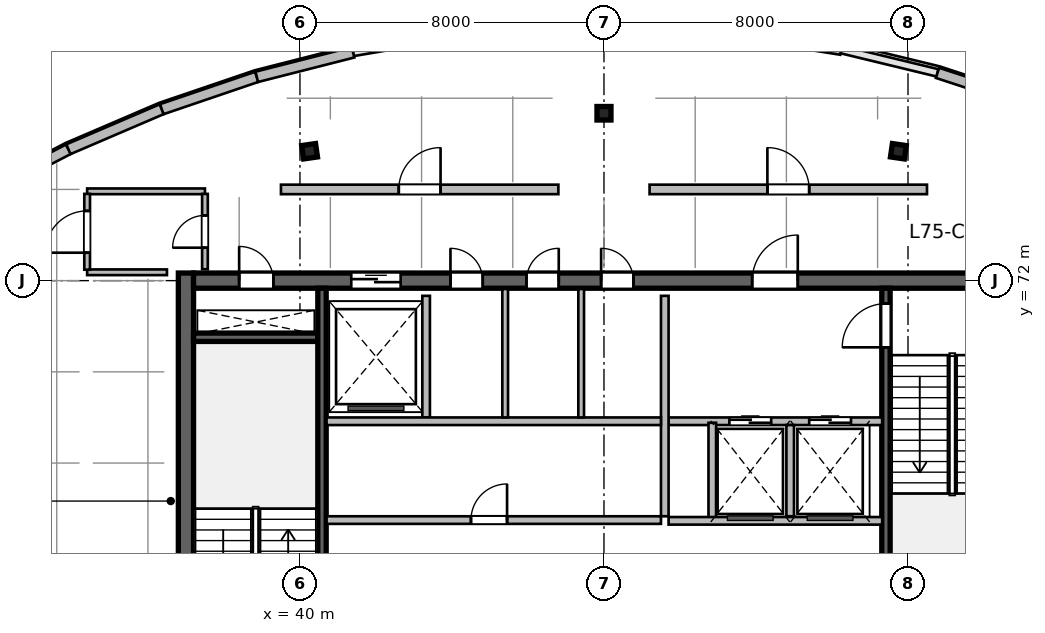
"""IFC4 building model, lengths in metres.
Left out: names, types, materials, properties, quantities, classifications, styles, units other than length and angle.
Written with IfcOpenShell. Run it as: python <this file> out.ifc"""

import sys

from ifc_helpers import new_model, si_unit, direction, frame, frame_2d, origin, origin_2d, place, context, subcontext, project, spatial, rectangle, i_section, extrude, source, transform, mapped, element, fill, save


model = new_model("IFC4")
c1 = context("Model", 3, precision=1e-05, world=origin(), true_north=direction((0.0, 1.0)))
c2 = subcontext(c1, "Body", "Model", "MODEL_VIEW")
j1 = project(units=[si_unit("LENGTHUNIT", "METRE"), si_unit("PLANEANGLEUNIT", "RADIAN")], contexts=[c1])
p1 = place(None, origin())
s1 = spatial("IfcSite", under=j1, at=p1, CompositionType="ELEMENT")
p2 = place(p1, origin())
s2 = spatial("IfcBuilding", under=s1, at=p2, CompositionType="ELEMENT")
p3 = place(p2, frame((0.0, 0.0, 307.8)))
s3 = spatial("IfcBuildingStorey", under=s2, at=p3, CompositionType="ELEMENT", Elevation=307.8)
m1 = source(origin(), c2, "Body", "SweptSolid", [
    extrude(rectangle(XDim=12.0, YDim=0.4, at=frame_2d((6.0, 0.0))), origin(), (0.0, 0.0, 1.0), 4.8),
])
p4 = place(p3, frame((37.0, 60.2, 0.0), z_axis=(0.0, 0.0, 1.0), x_axis=(0.0, 1.0, 0.0)))
e1 = element("IfcWall", 1, at=p4, inside=s3, PredefinedType="SHEAR", context=c2, shape_type="MappedRepresentation", body=[
    mapped(m1, transform((0.0, 0.0, 0.0), scale=1.0)),
])
m2 = source(origin(), c2, "Body", "SweptSolid", [
    extrude(rectangle(XDim=21.6, YDim=0.4, at=frame_2d((10.8, 0.0))), origin(), (0.0, 0.0, 1.0), 4.8),
])
p5 = place(p3, frame((37.2, 72.0, 0.0), z_axis=(0.0, 0.0, 1.0), x_axis=(1.0, 0.0, 0.0)))
e2 = element("IfcWall", 2, at=p5, inside=s3, PredefinedType="SHEAR", context=c2, shape_type="MappedRepresentation", body=[
    mapped(m2, transform((0.0, 0.0, 0.0), scale=1.0)),
])
p6 = place(p5, frame((1.2, 0.0, 0.0)))
e3 = element("IfcOpeningElement", 3, at=p6, cuts=e2, PredefinedType="OPENING", context=c2, shape_type="SweptSolid", body=[
    extrude(rectangle(XDim=0.9, YDim=2.1, at=frame_2d((0.45, 1.05))), frame((0.0, 0.21, 0.0), z_axis=(0.0, -1.0, 0.0), x_axis=(1.0, 0.0, 0.0)), (0.0, 0.0, 1.0), 0.42),
])
p7 = place(p5, frame((14.7, 0.0, 0.0)))
e4 = element("IfcOpeningElement", 4, at=p7, cuts=e2, PredefinedType="OPENING", context=c2, shape_type="SweptSolid", body=[
    extrude(rectangle(XDim=1.2, YDim=2.15, at=frame_2d((0.6, 1.075))), frame((0.0, 0.21, 0.0), z_axis=(0.0, -1.0, 0.0), x_axis=(1.0, 0.0, 0.0)), (0.0, 0.0, 1.0), 0.42),
])
p8 = place(p5, frame((4.15, 0.0, 0.0)))
e5 = element("IfcOpeningElement", 5, at=p8, cuts=e2, PredefinedType="OPENING", context=c2, shape_type="SweptSolid", body=[
    extrude(rectangle(XDim=1.3, YDim=2.15, at=frame_2d((0.65, 1.075))), frame((0.0, 0.21, 0.0), z_axis=(0.0, -1.0, 0.0), x_axis=(1.0, 0.0, 0.0)), (0.0, 0.0, 1.0), 0.42),
])
p9 = place(p5, frame((6.76, 0.0, 0.0)))
e6 = element("IfcOpeningElement", 6, at=p9, cuts=e2, PredefinedType="OPENING", context=c2, shape_type="SweptSolid", body=[
    extrude(rectangle(XDim=0.85, YDim=2.1, at=frame_2d((0.425, 1.05))), frame((0.0, 0.21, 0.0), z_axis=(0.0, -1.0, 0.0), x_axis=(1.0, 0.0, 0.0)), (0.0, 0.0, 1.0), 0.42),
])
p10 = place(p5, frame((8.76, 0.0, 0.0)))
e7 = element("IfcOpeningElement", 7, at=p10, cuts=e2, PredefinedType="OPENING", context=c2, shape_type="SweptSolid", body=[
    extrude(rectangle(XDim=0.85, YDim=2.1, at=frame_2d((0.425, 1.05))), frame((0.0, 0.21, 0.0), z_axis=(0.0, -1.0, 0.0), x_axis=(1.0, 0.0, 0.0)), (0.0, 0.0, 1.0), 0.42),
])
p11 = place(p5, frame((10.725, 0.0, 0.0)))
e8 = element("IfcOpeningElement", 8, at=p11, cuts=e2, PredefinedType="OPENING", context=c2, shape_type="SweptSolid", body=[
    extrude(rectangle(XDim=0.85, YDim=2.1, at=frame_2d((0.425, 1.05))), frame((0.0, 0.21, 0.0), z_axis=(0.0, -1.0, 0.0), x_axis=(1.0, 0.0, 0.0)), (0.0, 0.0, 1.0), 0.42),
])
m3 = source(origin(), c2, "Body", "SweptSolid", [
    extrude(rectangle(XDim=3.27, YDim=0.22, at=frame_2d((1.635, 0.0))), origin(), (0.0, 0.0, 1.0), 4.8),
])
p12 = place(p3, frame((37.2, 70.51, 0.0), z_axis=(0.0, 0.0, 1.0), x_axis=(1.0, 0.0, 0.0)))
e9 = element("IfcWall", 9, at=p12, inside=s3, PredefinedType="SHEAR", context=c2, shape_type="MappedRepresentation", body=[
    mapped(m3, transform((0.0, 0.0, 0.0), scale=1.0)),
])
m4 = source(origin(), c2, "Body", "SweptSolid", [
    extrude(rectangle(XDim=11.2, YDim=0.22, at=frame_2d((5.6, 0.0))), origin(), (0.0, 0.0, 1.0), 4.8),
])
p13 = place(p3, frame((40.58, 60.6, 0.0), z_axis=(0.0, 0.0, 1.0), x_axis=(0.0, 1.0, 0.0)))
e10 = element("IfcWall", 10, at=p13, inside=s3, PredefinedType="SHEAR", context=c2, shape_type="MappedRepresentation", body=[
    mapped(m4, transform((0.0, 0.0, 0.0), scale=1.0)),
])
p14 = place(p3, frame((55.42, 60.6, 0.0), z_axis=(0.0, 0.0, 1.0), x_axis=(0.0, 1.0, 0.0)))
e11 = element("IfcWall", 11, at=p14, inside=s3, PredefinedType="SHEAR", context=c2, shape_type="MappedRepresentation", body=[
    mapped(m4, transform((0.0, 0.0, 0.0), scale=1.0)),
])
p15 = place(p14, frame((9.645, 0.0, 0.0)))
e12 = element("IfcOpeningElement", 12, at=p15, cuts=e11, PredefinedType="OPENING", context=c2, shape_type="SweptSolid", body=[
    extrude(rectangle(XDim=1.15, YDim=2.15, at=frame_2d((0.575, 1.075))), frame((0.0, 0.12, 0.0), z_axis=(0.0, -1.0, 0.0), x_axis=(1.0, 0.0, 0.0)), (0.0, 0.0, 1.0), 0.24),
])
m5 = source(origin(), c2, "Body", "SweptSolid", [
    extrude(i_section(OverallWidth=0.369, OverallDepth=0.356, WebThickness=0.011, FlangeThickness=0.018, at=origin_2d()), origin(), (0.0, 0.0, 1.0), 4.8),
])
for number, where, z_axis, x_axis in (
    (13, (40.253, 75.404, 0.0), (0.0, 0.0, 1.0), (-0.143, 0.99, 0.0)),
    (14, (48.0, 76.404, 0.0), (0.0, 0.0, 1.0), (0.0, 1.0, 0.0)),
    (15, (55.747, 75.404, 0.0), (0.0, 0.0, 1.0), (0.143, 0.99, 0.0)),
):
    element("IfcColumn", number, at=place(p3, frame(where, z_axis=z_axis, x_axis=x_axis)), inside=s3, PredefinedType="COLUMN", context=c2, shape_type="MappedRepresentation", body=[
        mapped(m5, transform((0.0, 0.0, 0.0), scale=1.0)),
    ])
m6 = source(origin(), c2, "Body", "SweptSolid", [
    extrude(rectangle(XDim=2.711, YDim=0.28, at=frame_2d((1.356, 0.0))), origin(), (0.0, 0.0, 1.0), 4.5),
])
p16 = place(p3, frame((31.502, 74.205, 0.0), z_axis=(0.0, 0.0, 1.0), x_axis=(0.886828760751, 0.462098202881, 0.0)))
e16 = element("IfcWall", 16, at=p16, inside=s3, PredefinedType="SOLIDWALL", context=c2, shape_type="MappedRepresentation", body=[
    mapped(m6, transform((0.0, 0.0, 0.0), scale=1.0)),
])
m7 = source(origin(), c2, "Body", "SweptSolid", [
    extrude(rectangle(XDim=2.673, YDim=0.28, at=frame_2d((1.337, 0.0))), origin(), (0.0, 0.0, 1.0), 4.5),
])
p17 = place(p3, frame((33.907, 75.458, 0.0), z_axis=(0.0, 0.0, 1.0), x_axis=(0.919036345912, 0.394172798266, 0.0)))
e17 = element("IfcWall", 17, at=p17, inside=s3, PredefinedType="SOLIDWALL", context=c2, shape_type="MappedRepresentation", body=[
    mapped(m7, transform((0.0, 0.0, 0.0), scale=1.0)),
])
m8 = source(origin(), c2, "Body", "SweptSolid", [
    extrude(rectangle(XDim=2.64, YDim=0.28, at=frame_2d((1.32, 0.0))), origin(), (0.0, 0.0, 1.0), 4.5),
])
p18 = place(p3, frame((36.364, 76.511, 0.0), z_axis=(0.0, 0.0, 1.0), x_axis=(0.946685911962, 0.322158011064, 0.0)))
e18 = element("IfcWall", 18, at=p18, inside=s3, PredefinedType="SOLIDWALL", context=c2, shape_type="MappedRepresentation", body=[
    mapped(m8, transform((0.0, 0.0, 0.0), scale=1.0)),
])
m9 = source(origin(), c2, "Body", "SweptSolid", [
    extrude(rectangle(XDim=2.614, YDim=0.28, at=frame_2d((1.307, 0.0))), origin(), (0.0, 0.0, 1.0), 4.5),
])
p19 = place(p3, frame((38.863, 77.362, 0.0), z_axis=(0.0, 0.0, 1.0), x_axis=(0.969106509315, 0.246642602978, 0.0)))
e19 = element("IfcWall", 19, at=p19, inside=s3, PredefinedType="SOLIDWALL", context=c2, shape_type="MappedRepresentation", body=[
    mapped(m9, transform((0.0, 0.0, 0.0), scale=1.0)),
])
m10 = source(origin(), c2, "Body", "SweptSolid", [
    extrude(rectangle(XDim=2.593, YDim=0.28, at=frame_2d((1.296, 0.0))), origin(), (0.0, 0.0, 1.0), 4.5),
])
p20 = place(p3, frame((51.679, 78.488, 0.0), z_axis=(0.0, 0.0, 1.0), x_axis=(0.987661204406, -0.156605700126, 0.0)))
e20 = element("IfcWall", 20, at=p20, inside=s3, PredefinedType="SOLIDWALL", context=c2, shape_type="MappedRepresentation", body=[
    mapped(m10, transform((0.0, 0.0, 0.0), scale=1.0)),
])
m11 = source(origin(), c2, "Body", "SweptSolid", [
    extrude(rectangle(XDim=2.636, YDim=0.28, at=frame_2d((1.318, 0.0))), origin(), (0.0, 0.0, 1.0), 4.5),
])
p21 = place(p3, frame((56.777, 77.467, 0.0), z_axis=(0.0, 0.0, 1.0), x_axis=(0.950200321617, -0.311639774097, 0.0)))
e21 = element("IfcWall", 21, at=p21, inside=s3, PredefinedType="SOLIDWALL", context=c2, shape_type="MappedRepresentation", body=[
    mapped(m11, transform((0.0, 0.0, 0.0), scale=1.0)),
])
m12 = source(origin(), c2, "Body", "SweptSolid", [
    extrude(rectangle(XDim=5.62, YDim=0.2, at=frame_2d((2.81, 0.0))), origin(), (0.0, 0.0, 1.0), 4.5),
])
p22 = place(p3, frame((49.7, 68.3, 0.0), z_axis=(0.0, 0.0, 1.0), x_axis=(1.0, 0.0, 0.0)))
e22 = element("IfcWall", 22, at=p22, inside=s3, PredefinedType="SOLIDWALL", context=c2, shape_type="MappedRepresentation", body=[
    mapped(m12, transform((0.0, 0.0, 0.0), scale=1.0)),
])
p23 = place(p22, frame((1.6, 0.0, 0.0)))
e23 = element("IfcOpeningElement", 23, at=p23, cuts=e22, PredefinedType="OPENING", context=c2, shape_type="SweptSolid", body=[
    extrude(rectangle(XDim=1.1, YDim=2.15, at=frame_2d((0.55, 1.075))), frame((0.0, 0.11, 0.0), z_axis=(0.0, -1.0, 0.0), x_axis=(1.0, 0.0, 0.0)), (0.0, 0.0, 1.0), 0.22),
])
p24 = place(p22, frame((3.7, 0.0, 0.0)))
e24 = element("IfcOpeningElement", 24, at=p24, cuts=e22, PredefinedType="OPENING", context=c2, shape_type="SweptSolid", body=[
    extrude(rectangle(XDim=1.1, YDim=2.15, at=frame_2d((0.55, 1.075))), frame((0.0, 0.11, 0.0), z_axis=(0.0, -1.0, 0.0), x_axis=(1.0, 0.0, 0.0)), (0.0, 0.0, 1.0), 0.22),
])
m13 = source(origin(), c2, "Body", "SweptSolid", [
    extrude(rectangle(XDim=5.8, YDim=0.2, at=frame_2d((2.9, 0.0))), origin(), (0.0, 0.0, 1.0), 4.5),
])
p25 = place(p3, frame((49.6, 65.8, 0.0), z_axis=(0.0, 0.0, 1.0), x_axis=(0.0, 1.0, 0.0)))
e25 = element("IfcWall", 25, at=p25, inside=s3, PredefinedType="SOLIDWALL", context=c2, shape_type="MappedRepresentation", body=[
    mapped(m13, transform((0.0, 0.0, 0.0), scale=1.0)),
])
m14 = source(origin(), c2, "Body", "SweptSolid", [
    extrude(rectangle(XDim=2.58, YDim=0.2, at=frame_2d((1.29, 0.0))), origin(), (0.0, 0.0, 1.0), 4.5),
])
p26 = place(p3, frame((50.85, 65.68, 0.0), z_axis=(0.0, 0.0, 1.0), x_axis=(0.0, 1.0, 0.0)))
e26 = element("IfcWall", 26, at=p26, inside=s3, PredefinedType="SOLIDWALL", context=c2, shape_type="MappedRepresentation", body=[
    mapped(m14, transform((0.0, 0.0, 0.0), scale=1.0)),
])
m15 = source(origin(), c2, "Body", "SweptSolid", [
    extrude(rectangle(XDim=2.4, YDim=0.2, at=frame_2d((1.2, 0.0))), origin(), (0.0, 0.0, 1.0), 4.5),
])
p27 = place(p3, frame((52.9, 65.8, 0.0), z_axis=(0.0, 0.0, 1.0), x_axis=(0.0, 1.0, 0.0)))
e27 = element("IfcWall", 27, at=p27, inside=s3, PredefinedType="SOLIDWALL", context=c2, shape_type="MappedRepresentation", body=[
    mapped(m15, transform((0.0, 0.0, 0.0), scale=1.0)),
])
p28 = place(p3, frame((49.7, 65.68, 0.0), z_axis=(0.0, 0.0, 1.0), x_axis=(1.0, 0.0, 0.0)))
e28 = element("IfcWall", 28, at=p28, inside=s3, PredefinedType="SOLIDWALL", context=c2, shape_type="MappedRepresentation", body=[
    mapped(m12, transform((0.0, 0.0, 0.0), scale=1.0)),
])
m16 = source(origin(), c2, "Body", "SweptSolid", [
    extrude(rectangle(XDim=3.2, YDim=0.2, at=frame_2d((1.6, 0.0))), origin(), (0.0, 0.0, 1.0), 4.5),
])
p29 = place(p3, frame((43.32, 68.4, 0.0), z_axis=(0.0, 0.0, 1.0), x_axis=(0.0, 1.0, 0.0)))
e29 = element("IfcWall", 29, at=p29, inside=s3, PredefinedType="SOLIDWALL", context=c2, shape_type="MappedRepresentation", body=[
    mapped(m16, transform((0.0, 0.0, 0.0), scale=1.0)),
])
m17 = source(origin(), c2, "Body", "SweptSolid", [
    extrude(rectangle(XDim=8.8, YDim=0.2, at=frame_2d((4.4, 0.0))), origin(), (0.0, 0.0, 1.0), 4.5),
])
p30 = place(p3, frame((40.7, 68.3, 0.0), z_axis=(0.0, 0.0, 1.0), x_axis=(1.0, 0.0, 0.0)))
e30 = element("IfcWall", 30, at=p30, inside=s3, PredefinedType="SOLIDWALL", context=c2, shape_type="MappedRepresentation", body=[
    mapped(m17, transform((0.0, 0.0, 0.0), scale=1.0)),
])
m18 = source(origin(), c2, "Body", "SweptSolid", [
    extrude(rectangle(XDim=3.38, YDim=0.15, at=frame_2d((1.69, 0.0))), origin(), (0.0, 0.0, 1.0), 4.5),
])
for number, where, z_axis, x_axis in (
    (31, (45.4, 68.4, 0.0), (0.0, 0.0, 1.0), (0.0, 1.0, 0.0)),
    (32, (47.4, 68.4, 0.0), (0.0, 0.0, 1.0), (0.0, 1.0, 0.0)),
):
    element("IfcWall", number, at=place(p3, frame(where, z_axis=z_axis, x_axis=x_axis)), inside=s3, PredefinedType="PARTITIONING", context=c2, shape_type="MappedRepresentation", body=[
        mapped(m18, transform((0.0, 0.0, 0.0), scale=1.0)),
    ])
p31 = place(p3, frame((40.7, 65.7, 0.0), z_axis=(0.0, 0.0, 1.0), x_axis=(1.0, 0.0, 0.0)))
e33 = element("IfcWall", 33, at=p31, inside=s3, PredefinedType="SOLIDWALL", context=c2, shape_type="MappedRepresentation", body=[
    mapped(m17, transform((0.0, 0.0, 0.0), scale=1.0)),
])
p32 = place(p31, frame((3.8, 0.0, 0.0)))
e34 = element("IfcOpeningElement", 34, at=p32, cuts=e33, PredefinedType="OPENING", context=c2, shape_type="SweptSolid", body=[
    extrude(rectangle(XDim=0.95, YDim=2.15, at=frame_2d((0.475, 1.075))), frame((0.0, 0.11, 0.0), z_axis=(0.0, -1.0, 0.0), x_axis=(1.0, 0.0, 0.0)), (0.0, 0.0, 1.0), 0.22),
])
m19 = source(origin(), c2, "Body", "SweptSolid", [
    extrude(rectangle(XDim=2.1, YDim=0.15, at=frame_2d((1.05, 0.0))), origin(), (0.0, 0.0, 1.0), 4.5),
])
p33 = place(p3, frame((34.4, 72.22, 0.0), z_axis=(0.0, 0.0, 1.0), x_axis=(1.0, 0.0, 0.0)))
e35 = element("IfcWall", 35, at=p33, inside=s3, PredefinedType="PARTITIONING", context=c2, shape_type="MappedRepresentation", body=[
    mapped(m19, transform((0.0, 0.0, 0.0), scale=1.0)),
])
m20 = source(origin(), c2, "Body", "SweptSolid", [
    extrude(rectangle(XDim=3.1, YDim=0.15, at=frame_2d((1.55, 0.0))), origin(), (0.0, 0.0, 1.0), 3.931),
])
p34 = place(p3, frame((34.4, 74.35, 0.0), z_axis=(0.0, 0.0, 1.0), x_axis=(1.0, 0.0, 0.0)))
e36 = element("IfcWall", 36, at=p34, inside=s3, PredefinedType="PARTITIONING", context=c2, shape_type="MappedRepresentation", body=[
    mapped(m20, transform((0.0, 0.0, 0.0), scale=1.0)),
])
m21 = source(origin(), c2, "Body", "SweptSolid", [
    extrude(rectangle(XDim=1.995, YDim=0.15, at=frame_2d((0.998, 0.0))), origin(), (0.0, 0.0, 1.0), 4.5),
])
p35 = place(p3, frame((34.4, 72.288, 0.0), z_axis=(0.0, 0.0, 1.0), x_axis=(0.0, 1.0, 0.0)))
e37 = element("IfcWall", 37, at=p35, inside=s3, PredefinedType="PARTITIONING", context=c2, shape_type="MappedRepresentation", body=[
    mapped(m21, transform((0.0, 0.0, 0.0), scale=1.0)),
])
p36 = place(p35, frame((0.448, 0.0, 0.0)))
e38 = element("IfcOpeningElement", 38, at=p36, cuts=e37, PredefinedType="OPENING", context=c2, shape_type="SweptSolid", body=[
    extrude(rectangle(XDim=1.1, YDim=2.15, at=frame_2d((0.55, 1.075))), frame((0.0, 0.085, 0.0), z_axis=(0.0, -1.0, 0.0), x_axis=(1.0, 0.0, 0.0)), (0.0, 0.0, 1.0), 0.17),
])
m22 = source(origin(), c2, "Body", "SweptSolid", [
    extrude(rectangle(XDim=1.982, YDim=0.15, at=frame_2d((0.991, 0.0))), origin(), (0.0, 0.0, 1.0), 4.5),
])
p37 = place(p3, frame((37.5, 72.3, 0.0), z_axis=(0.0, 0.0, 1.0), x_axis=(0.0, 1.0, 0.0)))
e39 = element("IfcWall", 39, at=p37, inside=s3, PredefinedType="PARTITIONING", context=c2, shape_type="MappedRepresentation", body=[
    mapped(m22, transform((0.0, 0.0, 0.0), scale=1.0)),
])
p38 = place(p37, frame((0.566, 0.0, 0.0)))
e40 = element("IfcOpeningElement", 40, at=p38, cuts=e39, PredefinedType="OPENING", context=c2, shape_type="SweptSolid", body=[
    extrude(rectangle(XDim=0.85, YDim=2.1, at=frame_2d((0.425, 1.05))), frame((0.0, 0.085, 0.0), z_axis=(0.0, -1.0, 0.0), x_axis=(1.0, 0.0, 0.0)), (0.0, 0.0, 1.0), 0.17),
])
m23 = source(origin(), c2, "Body", "SweptSolid", [
    extrude(rectangle(XDim=7.3, YDim=0.25, at=frame_2d((3.65, 0.0))), origin(), (0.0, 0.0, 1.0), 4.5),
])
p39 = place(p3, frame((39.5, 74.4, 0.0), z_axis=(0.0, 0.0, 1.0), x_axis=(1.0, 0.0, 0.0)))
e41 = element("IfcWall", 41, at=p39, inside=s3, PredefinedType="PARTITIONING", context=c2, shape_type="MappedRepresentation", body=[
    mapped(m23, transform((0.0, 0.0, 0.0), scale=1.0)),
])
p40 = place(p39, frame((3.1, 0.0, 0.0)))
e42 = element("IfcOpeningElement", 42, at=p40, cuts=e41, PredefinedType="OPENING", context=c2, shape_type="SweptSolid", body=[
    extrude(rectangle(XDim=1.1, YDim=2.15, at=frame_2d((0.55, 1.075))), frame((0.0, 0.135, 0.0), z_axis=(0.0, -1.0, 0.0), x_axis=(1.0, 0.0, 0.0)), (0.0, 0.0, 1.0), 0.27),
])
p41 = place(p3, frame((49.2, 74.4, 0.0), z_axis=(0.0, 0.0, 1.0), x_axis=(1.0, 0.0, 0.0)))
e43 = element("IfcWall", 43, at=p41, inside=s3, PredefinedType="PARTITIONING", context=c2, shape_type="MappedRepresentation", body=[
    mapped(m23, transform((0.0, 0.0, 0.0), scale=1.0)),
])
p42 = place(p41, frame((3.1, 0.0, 0.0)))
e44 = element("IfcOpeningElement", 44, at=p42, cuts=e43, PredefinedType="OPENING", context=c2, shape_type="SweptSolid", body=[
    extrude(rectangle(XDim=1.1, YDim=2.15, at=frame_2d((0.55, 1.075))), frame((0.0, 0.135, 0.0), z_axis=(0.0, -1.0, 0.0), x_axis=(1.0, 0.0, 0.0)), (0.0, 0.0, 1.0), 0.27),
])
m24 = source(origin(), c2, "Body", "SweptSolid", [
    extrude(rectangle(XDim=0.9, YDim=2.1, at=frame_2d((0.45, 1.05))), frame((0.0, 0.025, 0.0), z_axis=(0.0, -1.0, 0.0), x_axis=(1.0, 0.0, 0.0)), (0.0, 0.0, 1.0), 0.05),
])
p43 = place(p6, origin())
e45 = element("IfcDoor", 45, at=p43, inside=s3, OperationType="SINGLE_SWING_LEFT", PredefinedType="DOOR", context=c2, shape_type="MappedRepresentation", body=[
    mapped(m24, transform((0.0, 0.0, 0.0), scale=1.0)),
])
fill(e3, e45)
m25 = source(origin(), c2, "Body", "SweptSolid", [
    extrude(rectangle(XDim=1.15, YDim=2.15, at=frame_2d((0.575, 1.075))), frame((0.0, 0.025, 0.0), z_axis=(0.0, -1.0, 0.0), x_axis=(1.0, 0.0, 0.0)), (0.0, 0.0, 1.0), 0.05),
])
p44 = place(p15, origin())
e46 = element("IfcDoor", 46, at=p44, inside=s3, OperationType="SINGLE_SWING_LEFT", PredefinedType="DOOR", context=c2, shape_type="MappedRepresentation", body=[
    mapped(m25, transform((0.0, 0.0, 0.0), scale=1.0)),
])
fill(e12, e46)
m26 = source(origin(), c2, "Body", "SweptSolid", [
    extrude(rectangle(XDim=1.2, YDim=2.15, at=frame_2d((0.6, 1.075))), frame((0.0, 0.025, 0.0), z_axis=(0.0, -1.0, 0.0), x_axis=(1.0, 0.0, 0.0)), (0.0, 0.0, 1.0), 0.05),
])
p45 = place(p7, origin())
e47 = element("IfcDoor", 47, at=p45, inside=s3, OperationType="SINGLE_SWING_RIGHT", PredefinedType="DOOR", context=c2, shape_type="MappedRepresentation", body=[
    mapped(m26, transform((0.0, 0.0, 0.0), scale=1.0)),
])
fill(e4, e47)
m27 = source(origin(), c2, "Body", "SweptSolid", [
    extrude(rectangle(XDim=1.1, YDim=2.15, at=frame_2d((0.55, 1.075))), frame((0.0, 0.025, 0.0), z_axis=(0.0, -1.0, 0.0), x_axis=(1.0, 0.0, 0.0)), (0.0, 0.0, 1.0), 0.05),
])
p46 = place(p23, origin())
e48 = element("IfcDoor", 48, at=p46, inside=s3, OperationType="DOUBLE_DOOR_SLIDING", PredefinedType="DOOR", context=c2, shape_type="MappedRepresentation", body=[
    mapped(m27, transform((0.0, 0.0, 0.0), scale=1.0)),
])
fill(e23, e48)
p47 = place(p24, origin())
e49 = element("IfcDoor", 49, at=p47, inside=s3, OperationType="DOUBLE_DOOR_SLIDING", PredefinedType="DOOR", context=c2, shape_type="MappedRepresentation", body=[
    mapped(m27, transform((0.0, 0.0, 0.0), scale=1.0)),
])
fill(e24, e49)
m28 = source(origin(), c2, "Body", "SweptSolid", [
    extrude(rectangle(XDim=1.3, YDim=2.15, at=frame_2d((0.65, 1.075))), frame((0.0, 0.025, 0.0), z_axis=(0.0, -1.0, 0.0), x_axis=(1.0, 0.0, 0.0)), (0.0, 0.0, 1.0), 0.05),
])
p48 = place(p8, origin())
e50 = element("IfcDoor", 50, at=p48, inside=s3, OperationType="DOUBLE_DOOR_SLIDING", PredefinedType="DOOR", context=c2, shape_type="MappedRepresentation", body=[
    mapped(m28, transform((0.0, 0.0, 0.0), scale=1.0)),
])
fill(e5, e50)
m29 = source(origin(), c2, "Body", "SweptSolid", [
    extrude(rectangle(XDim=0.85, YDim=2.1, at=frame_2d((0.425, 1.05))), frame((0.0, 0.025, 0.0), z_axis=(0.0, -1.0, 0.0), x_axis=(1.0, 0.0, 0.0)), (0.0, 0.0, 1.0), 0.05),
])
p49 = place(p9, origin())
e51 = element("IfcDoor", 51, at=p49, inside=s3, OperationType="SINGLE_SWING_LEFT", PredefinedType="DOOR", context=c2, shape_type="MappedRepresentation", body=[
    mapped(m29, transform((0.0, 0.0, 0.0), scale=1.0)),
])
fill(e6, e51)
p50 = place(p10, origin())
e52 = element("IfcDoor", 52, at=p50, inside=s3, OperationType="SINGLE_SWING_RIGHT", PredefinedType="DOOR", context=c2, shape_type="MappedRepresentation", body=[
    mapped(m29, transform((0.0, 0.0, 0.0), scale=1.0)),
])
fill(e7, e52)
p51 = place(p11, origin())
e53 = element("IfcDoor", 53, at=p51, inside=s3, OperationType="SINGLE_SWING_LEFT", PredefinedType="DOOR", context=c2, shape_type="MappedRepresentation", body=[
    mapped(m29, transform((0.0, 0.0, 0.0), scale=1.0)),
])
fill(e8, e53)
m30 = source(origin(), c2, "Body", "SweptSolid", [
    extrude(rectangle(XDim=0.95, YDim=2.15, at=frame_2d((0.475, 1.075))), frame((0.0, 0.025, 0.0), z_axis=(0.0, -1.0, 0.0), x_axis=(1.0, 0.0, 0.0)), (0.0, 0.0, 1.0), 0.05),
])
p52 = place(p32, origin())
e54 = element("IfcDoor", 54, at=p52, inside=s3, OperationType="SINGLE_SWING_RIGHT", PredefinedType="DOOR", context=c2, shape_type="MappedRepresentation", body=[
    mapped(m30, transform((0.0, 0.0, 0.0), scale=1.0)),
])
fill(e34, e54)
p53 = place(p38, origin())
e55 = element("IfcDoor", 55, at=p53, inside=s3, OperationType="SINGLE_SWING_LEFT", PredefinedType="DOOR", context=c2, shape_type="MappedRepresentation", body=[
    mapped(m29, transform((0.0, 0.0, 0.0), scale=1.0)),
])
fill(e40, e55)
m31 = source(origin(), c2, "Body", "SweptSolid", [
    extrude(rectangle(XDim=1.1, YDim=2.15, at=frame_2d((0.55, 1.075))), frame((0.0, 0.025, 0.0), z_axis=(0.0, -1.0, 0.0), x_axis=(1.0, 0.0, 0.0)), (0.0, 0.0, 1.0), 0.05),
])
p54 = place(p40, origin())
e56 = element("IfcDoor", 56, at=p54, inside=s3, OperationType="SINGLE_SWING_RIGHT", PredefinedType="DOOR", context=c2, shape_type="MappedRepresentation", body=[
    mapped(m31, transform((0.0, 0.0, 0.0), scale=1.0)),
])
fill(e42, e56)
p55 = place(p42, origin())
e57 = element("IfcDoor", 57, at=p55, inside=s3, OperationType="SINGLE_SWING_LEFT", PredefinedType="DOOR", context=c2, shape_type="MappedRepresentation", body=[
    mapped(m31, transform((0.0, 0.0, 0.0), scale=1.0)),
])
fill(e44, e57)
p56 = place(p36, origin())
e58 = element("IfcDoor", 58, at=p56, inside=s3, OperationType="SINGLE_SWING_LEFT", PredefinedType="DOOR", context=c2, shape_type="MappedRepresentation", body=[
    mapped(m31, transform((0.0, 0.0, 0.0), scale=1.0)),
])
fill(e38, e58)
save(model, sys.argv[1])
